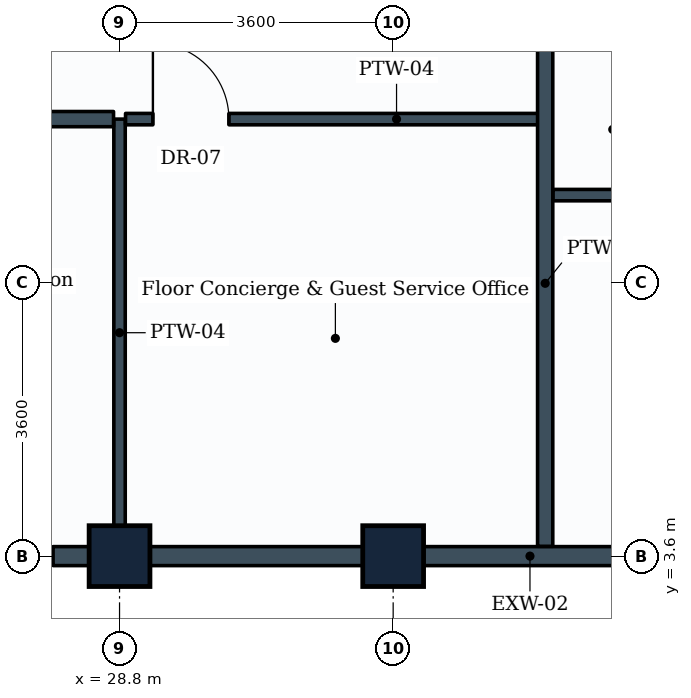
"""IFC4 building model, lengths in metres.
Left out: names, types, materials, properties, quantities, classifications, styles, units other than length and angle.
Written with IfcOpenShell. Run it as: python <this file> out.ifc"""

import sys

from ifc_helpers import new_model, si_unit, direction, frame, frame_2d, origin, origin_2d, place, context, subcontext, project, spatial, rectangle, extrude, element, fill, save


model = new_model("IFC4")
c1 = context("Model", 3, precision=1e-05, world=origin(), true_north=direction((0.0, 1.0)))
c2 = subcontext(c1, "Body", "Model", "MODEL_VIEW")
j1 = project(units=[si_unit("LENGTHUNIT", "METRE"), si_unit("PLANEANGLEUNIT", "RADIAN")], contexts=[c1])
p1 = place(None, origin())
s1 = spatial("IfcSite", under=j1, at=p1, CompositionType="ELEMENT")
p2 = place(p1, origin())
s2 = spatial("IfcBuilding", under=s1, at=p2, CompositionType="ELEMENT")
p3 = place(p2, frame((0.0, 0.0, 288.2)))
s3 = spatial("IfcBuildingStorey", under=s2, at=p3, CompositionType="ELEMENT", Elevation=288.2)
for number, where, z_axis, x_axis in (
    (1, (28.8, 3.6, 0.0), (0.0, 0.0, 1.0), (1.0, 0.0, 0.0)),
    (2, (32.4, 3.6, 0.0), (0.0, 0.0, 1.0), (1.0, 0.0, 0.0)),
):
    element("IfcColumn", number, at=place(p3, frame(where, z_axis=z_axis, x_axis=x_axis)), inside=s3, PredefinedType="COLUMN", context=c2, shape_type="SweptSolid", body=[
        extrude(rectangle(XDim=0.8, YDim=0.8, at=origin_2d()), origin(), (0.0, 0.0, 1.0), 3.6),
    ])
p4 = place(p3, frame((28.8, 3.6, 0.0), z_axis=(0.0, 0.0, 1.0), x_axis=(-1.0, 0.0, 0.0)))
e3 = element("IfcWall", 3, at=p4, inside=s3, PredefinedType="STANDARD", context=c2, shape_type="SweptSolid", body=[
    extrude(rectangle(XDim=3.6, YDim=0.25, at=frame_2d((1.8, 0.0))), origin(), (0.0, 0.0, 1.0), 2.83),
])
p5 = place(p4, frame((0.875, 0.0, 0.85)))
e4 = element("IfcOpeningElement", 4, at=p5, cuts=e3, PredefinedType="OPENING", context=c2, shape_type="SweptSolid", body=[
    extrude(rectangle(XDim=1.8, YDim=1.35, at=frame_2d((0.9, 0.675))), frame((0.0, 0.135, 0.0), z_axis=(0.0, -1.0, 0.0), x_axis=(1.0, 0.0, 0.0)), (0.0, 0.0, 1.0), 0.27),
])
p6 = place(p3, frame((32.4, 3.6, 0.0), z_axis=(0.0, 0.0, 1.0), x_axis=(-1.0, 0.0, 0.0)))
e5 = element("IfcWall", 5, at=p6, inside=s3, PredefinedType="STANDARD", context=c2, shape_type="SweptSolid", body=[
    extrude(rectangle(XDim=3.6, YDim=0.25, at=frame_2d((1.8, 0.0))), origin(), (0.0, 0.0, 1.0), 2.83),
])
p7 = place(p3, frame((36.0, 3.6, 0.0), z_axis=(0.0, 0.0, 1.0), x_axis=(-1.0, 0.0, 0.0)))
e6 = element("IfcWall", 6, at=p7, inside=s3, PredefinedType="STANDARD", context=c2, shape_type="SweptSolid", body=[
    extrude(rectangle(XDim=3.6, YDim=0.25, at=frame_2d((1.8, 0.0))), origin(), (0.0, 0.0, 1.0), 2.83),
])
p8 = place(p3, frame((28.8, 9.35, 0.0), z_axis=(0.0, 0.0, 1.0), x_axis=(0.0, -1.0, 0.0)))
e7 = element("IfcWall", 7, at=p8, inside=s3, PredefinedType="PARTITIONING", context=c2, shape_type="SweptSolid", body=[
    extrude(rectangle(XDim=5.621, YDim=0.15, at=frame_2d((2.811, 0.0))), origin(), (0.0, 0.0, 1.0), 3.335),
])
p9 = place(p3, frame((13.13, 9.35, 0.0), z_axis=(0.0, 0.0, 1.0), x_axis=(1.0, 0.0, 0.0)))
e8 = element("IfcWall", 8, at=p9, inside=s3, PredefinedType="PARTITIONING", context=c2, shape_type="SweptSolid", body=[
    extrude(rectangle(XDim=15.591, YDim=0.2, at=frame_2d((7.795, 0.0))), origin(), (0.0, 0.0, 1.0), 3.02),
])
p10 = place(p3, frame((28.879, 9.35, 0.0), z_axis=(0.0, 0.0, 1.0), x_axis=(1.0, 0.0, 0.0)))
e9 = element("IfcWall", 9, at=p10, inside=s3, PredefinedType="PARTITIONING", context=c2, shape_type="SweptSolid", body=[
    extrude(rectangle(XDim=5.521, YDim=0.15, at=frame_2d((2.76, 0.0))), origin(), (0.0, 0.0, 1.0), 3.335),
])
p11 = place(p10, frame((0.36, 0.0, 0.0)))
e10 = element("IfcOpeningElement", 10, at=p11, cuts=e9, PredefinedType="OPENING", context=c2, shape_type="SweptSolid", body=[
    extrude(rectangle(XDim=1.0, YDim=2.1, at=frame_2d((0.5, 1.05))), frame((0.0, 0.085, 0.0), z_axis=(0.0, -1.0, 0.0), x_axis=(1.0, 0.0, 0.0)), (0.0, 0.0, 1.0), 0.17),
])
p12 = place(p3, frame((34.4, 3.729, 0.0), z_axis=(0.0, 0.0, 1.0), x_axis=(0.0, 1.0, 0.0)))
e11 = element("IfcWall", 11, at=p12, inside=s3, PredefinedType="PARTITIONING", context=c2, shape_type="SweptSolid", body=[
    extrude(rectangle(XDim=6.921, YDim=0.2, at=frame_2d((3.46, 0.0))), origin(), (0.0, 0.0, 1.0), 2.83),
])
p13 = place(p3, frame((34.504, 8.35, 0.0), z_axis=(0.0, 0.0, 1.0), x_axis=(1.0, 0.0, 0.0)))
e12 = element("IfcWall", 12, at=p13, inside=s3, PredefinedType="PARTITIONING", context=c2, shape_type="SweptSolid", body=[
    extrude(rectangle(XDim=2.167, YDim=0.15, at=frame_2d((1.083, 0.0))), origin(), (0.0, 0.0, 1.0), 3.02),
])
p14 = place(p5, origin())
e13 = element("IfcWindow", 13, at=p14, inside=s3, PartitioningType="SINGLE_PANEL", PredefinedType="WINDOW", context=c2, shape_type="SweptSolid", body=[
    extrude(rectangle(XDim=1.8, YDim=1.35, at=frame_2d((0.9, 0.675))), frame((0.0, 0.03, 0.0), z_axis=(0.0, -1.0, 0.0), x_axis=(1.0, 0.0, 0.0)), (0.0, 0.0, 1.0), 0.06),
])
fill(e4, e13)
p15 = place(p11, origin())
e14 = element("IfcDoor", 14, at=p15, inside=s3, OperationType="SINGLE_SWING_LEFT", PredefinedType="DOOR", context=c2, shape_type="SweptSolid", body=[
    extrude(rectangle(XDim=1.0, YDim=2.1, at=frame_2d((0.5, 1.05))), frame((0.0, 0.025, 0.0), z_axis=(0.0, -1.0, 0.0), x_axis=(1.0, 0.0, 0.0)), (0.0, 0.0, 1.0), 0.05),
])
fill(e10, e14)
save(model, sys.argv[1])
